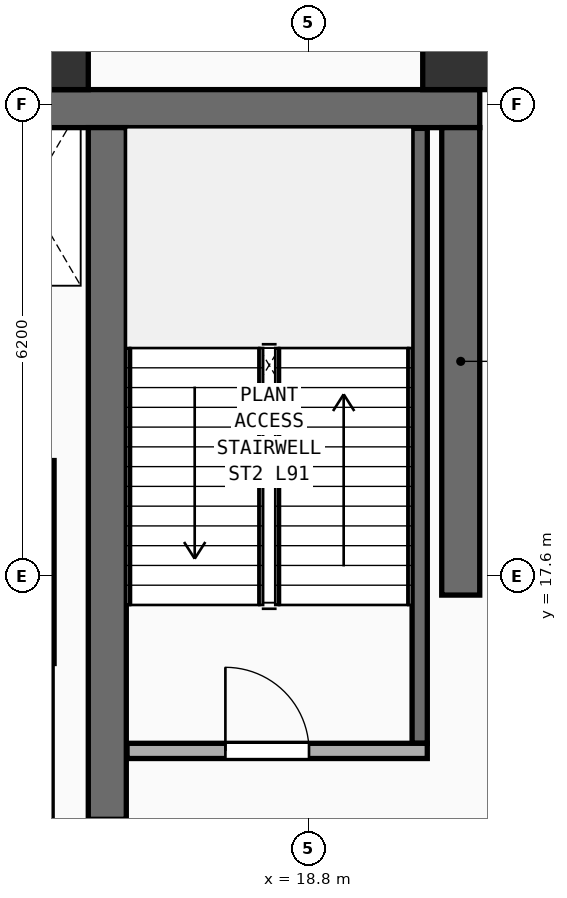
"""IFC4 building model, lengths in metres.
Left out: names, types, materials, properties, quantities, classifications, styles, units other than length and angle.
Written with IfcOpenShell. Run it as: python <this file> out.ifc"""

import sys

from ifc_helpers import new_model, si_unit, direction, frame, frame_2d, origin, origin_2d, place, context, subcontext, project, spatial, rectangle, extrude, element, fill, save


model = new_model("IFC4")
c1 = context("Model", 3, precision=1e-05, world=origin(), true_north=direction((0.0, 1.0)))
c2 = subcontext(c1, "Body", "Model", "MODEL_VIEW")
j1 = project(units=[si_unit("LENGTHUNIT", "METRE"), si_unit("PLANEANGLEUNIT", "RADIAN")], contexts=[c1])
p1 = place(None, origin())
s1 = spatial("IfcSite", under=j1, at=p1, CompositionType="ELEMENT")
p2 = place(p1, origin())
s2 = spatial("IfcBuilding", under=s1, at=p2, CompositionType="ELEMENT")
p3 = place(p2, frame((0.0, 0.0, 356.2)))
s3 = spatial("IfcBuildingStorey", under=s2, at=p3, CompositionType="ELEMENT", Elevation=356.2)
p4 = place(p3, frame((7.2, 23.75, 0.0), z_axis=(0.0, 0.0, 1.0), x_axis=(1.0, 0.0, 0.0)))
e1 = element("IfcWall", 1, at=p4, inside=s3, PredefinedType="SHEAR", context=c2, shape_type="SweptSolid", body=[
    extrude(rectangle(XDim=13.85, YDim=0.5, at=frame_2d((6.925, 0.0))), origin(), (0.0, 0.0, 1.0), 3.82),
])
p5 = place(p3, frame((20.8, 17.35, 0.0), z_axis=(0.0, 0.0, 1.0), x_axis=(0.0, 1.0, 0.0)))
e2 = element("IfcWall", 2, at=p5, inside=s3, PredefinedType="SHEAR", context=c2, shape_type="SweptSolid", body=[
    extrude(rectangle(XDim=6.15, YDim=0.5, at=frame_2d((3.075, 0.0))), origin(), (0.0, 0.0, 1.0), 3.82),
])
p6 = place(p3, frame((16.15, 14.4, 0.0), z_axis=(0.0, 0.0, 1.0), x_axis=(0.0, 1.0, 0.0)))
e3 = element("IfcWall", 3, at=p6, inside=s3, PredefinedType="SHEAR", context=c2, shape_type="SweptSolid", body=[
    extrude(rectangle(XDim=9.1, YDim=0.5, at=frame_2d((4.55, 0.0))), origin(), (0.0, 0.0, 1.0), 3.82),
])
for number, where, z_axis, x_axis in (
    (4, (15.45, 24.45, 0.0), (0.0, 0.0, 1.0), (1.0, 0.0, 0.0)),
    (5, (20.75, 24.45, 0.0), (0.0, 0.0, 1.0), (1.0, 0.0, 0.0)),
):
    element("IfcColumn", number, at=place(p3, frame(where, z_axis=z_axis, x_axis=x_axis)), inside=s3, PredefinedType="COLUMN", context=c2, shape_type="SweptSolid", body=[
        extrude(rectangle(XDim=0.9, YDim=0.9, at=origin_2d()), origin(), (0.0, 0.0, 1.0), 3.82),
    ])
p7 = place(p3, frame((27.485, 18.975, 0.0), z_axis=(0.0, 0.0, 1.0), x_axis=(-0.707106781187, 0.707106781187, 0.0)))
e6 = element("IfcWall", 6, at=p7, inside=s3, PredefinedType="SOLIDWALL", context=c2, shape_type="SweptSolid", body=[
    extrude(rectangle(XDim=9.207, YDim=0.28, at=frame_2d((4.603, 0.0))), origin(), (0.0, 0.0, 1.0), 3.82),
])
p8 = place(p3, frame((20.26, 15.4, 0.0), z_axis=(0.0, 0.0, 1.0), x_axis=(0.0, 1.0, 0.0)))
e7 = element("IfcWall", 7, at=p8, inside=s3, PredefinedType="SHEAR", context=c2, shape_type="SweptSolid", body=[
    extrude(rectangle(XDim=8.09, YDim=0.2, at=frame_2d((4.045, 0.0))), origin(), (0.0, 0.0, 1.0), 3.82),
])
p9 = place(p3, frame((16.41, 15.3, 0.0), z_axis=(0.0, 0.0, 1.0), x_axis=(1.0, 0.0, 0.0)))
e8 = element("IfcWall", 8, at=p9, inside=s3, PredefinedType="PARTITIONING", context=c2, shape_type="SweptSolid", body=[
    extrude(rectangle(XDim=3.95, YDim=0.2, at=frame_2d((1.975, 0.0))), origin(), (0.0, 0.0, 1.0), 3.82),
])
p10 = place(p9, frame((1.294, 0.0, 0.0)))
e9 = element("IfcOpeningElement", 9, at=p10, cuts=e8, PredefinedType="OPENING", context=c2, shape_type="SweptSolid", body=[
    extrude(rectangle(XDim=1.1, YDim=2.2, at=frame_2d((0.55, 1.1))), frame((0.0, 0.11, 0.0), z_axis=(0.0, -1.0, 0.0), x_axis=(1.0, 0.0, 0.0)), (0.0, 0.0, 1.0), 0.22),
])
p11 = place(p3, frame((15.35, 14.22, 0.0), z_axis=(0.0, 0.0, 1.0), x_axis=(0.0, 1.0, 0.0)))
e10 = element("IfcWall", 10, at=p11, inside=s3, PredefinedType="PARTITIONING", context=c2, shape_type="SweptSolid", body=[
    extrude(rectangle(XDim=2.23, YDim=0.15, at=frame_2d((1.115, 0.0))), origin(), (0.0, 0.0, 1.0), 3.82),
])
p12 = place(p3, frame((15.35, 16.45, 0.0), z_axis=(0.0, 0.0, 1.0), x_axis=(0.0, 1.0, 0.0)))
e11 = element("IfcWall", 11, at=p12, inside=s3, PredefinedType="PARTITIONING", context=c2, shape_type="SweptSolid", body=[
    extrude(rectangle(XDim=2.67, YDim=0.2, at=frame_2d((1.335, 0.0))), origin(), (0.0, 0.0, 1.0), 3.82),
])
p13 = place(p10, origin())
e12 = element("IfcDoor", 12, at=p13, inside=s3, OperationType="SINGLE_SWING_LEFT", PredefinedType="DOOR", context=c2, shape_type="SweptSolid", body=[
    extrude(rectangle(XDim=1.1, YDim=2.2, at=frame_2d((0.55, 1.1))), frame((0.0, 0.025, 0.0), z_axis=(0.0, -1.0, 0.0), x_axis=(1.0, 0.0, 0.0)), (0.0, 0.0, 1.0), 0.05),
])
fill(e9, e12)
save(model, sys.argv[1])
